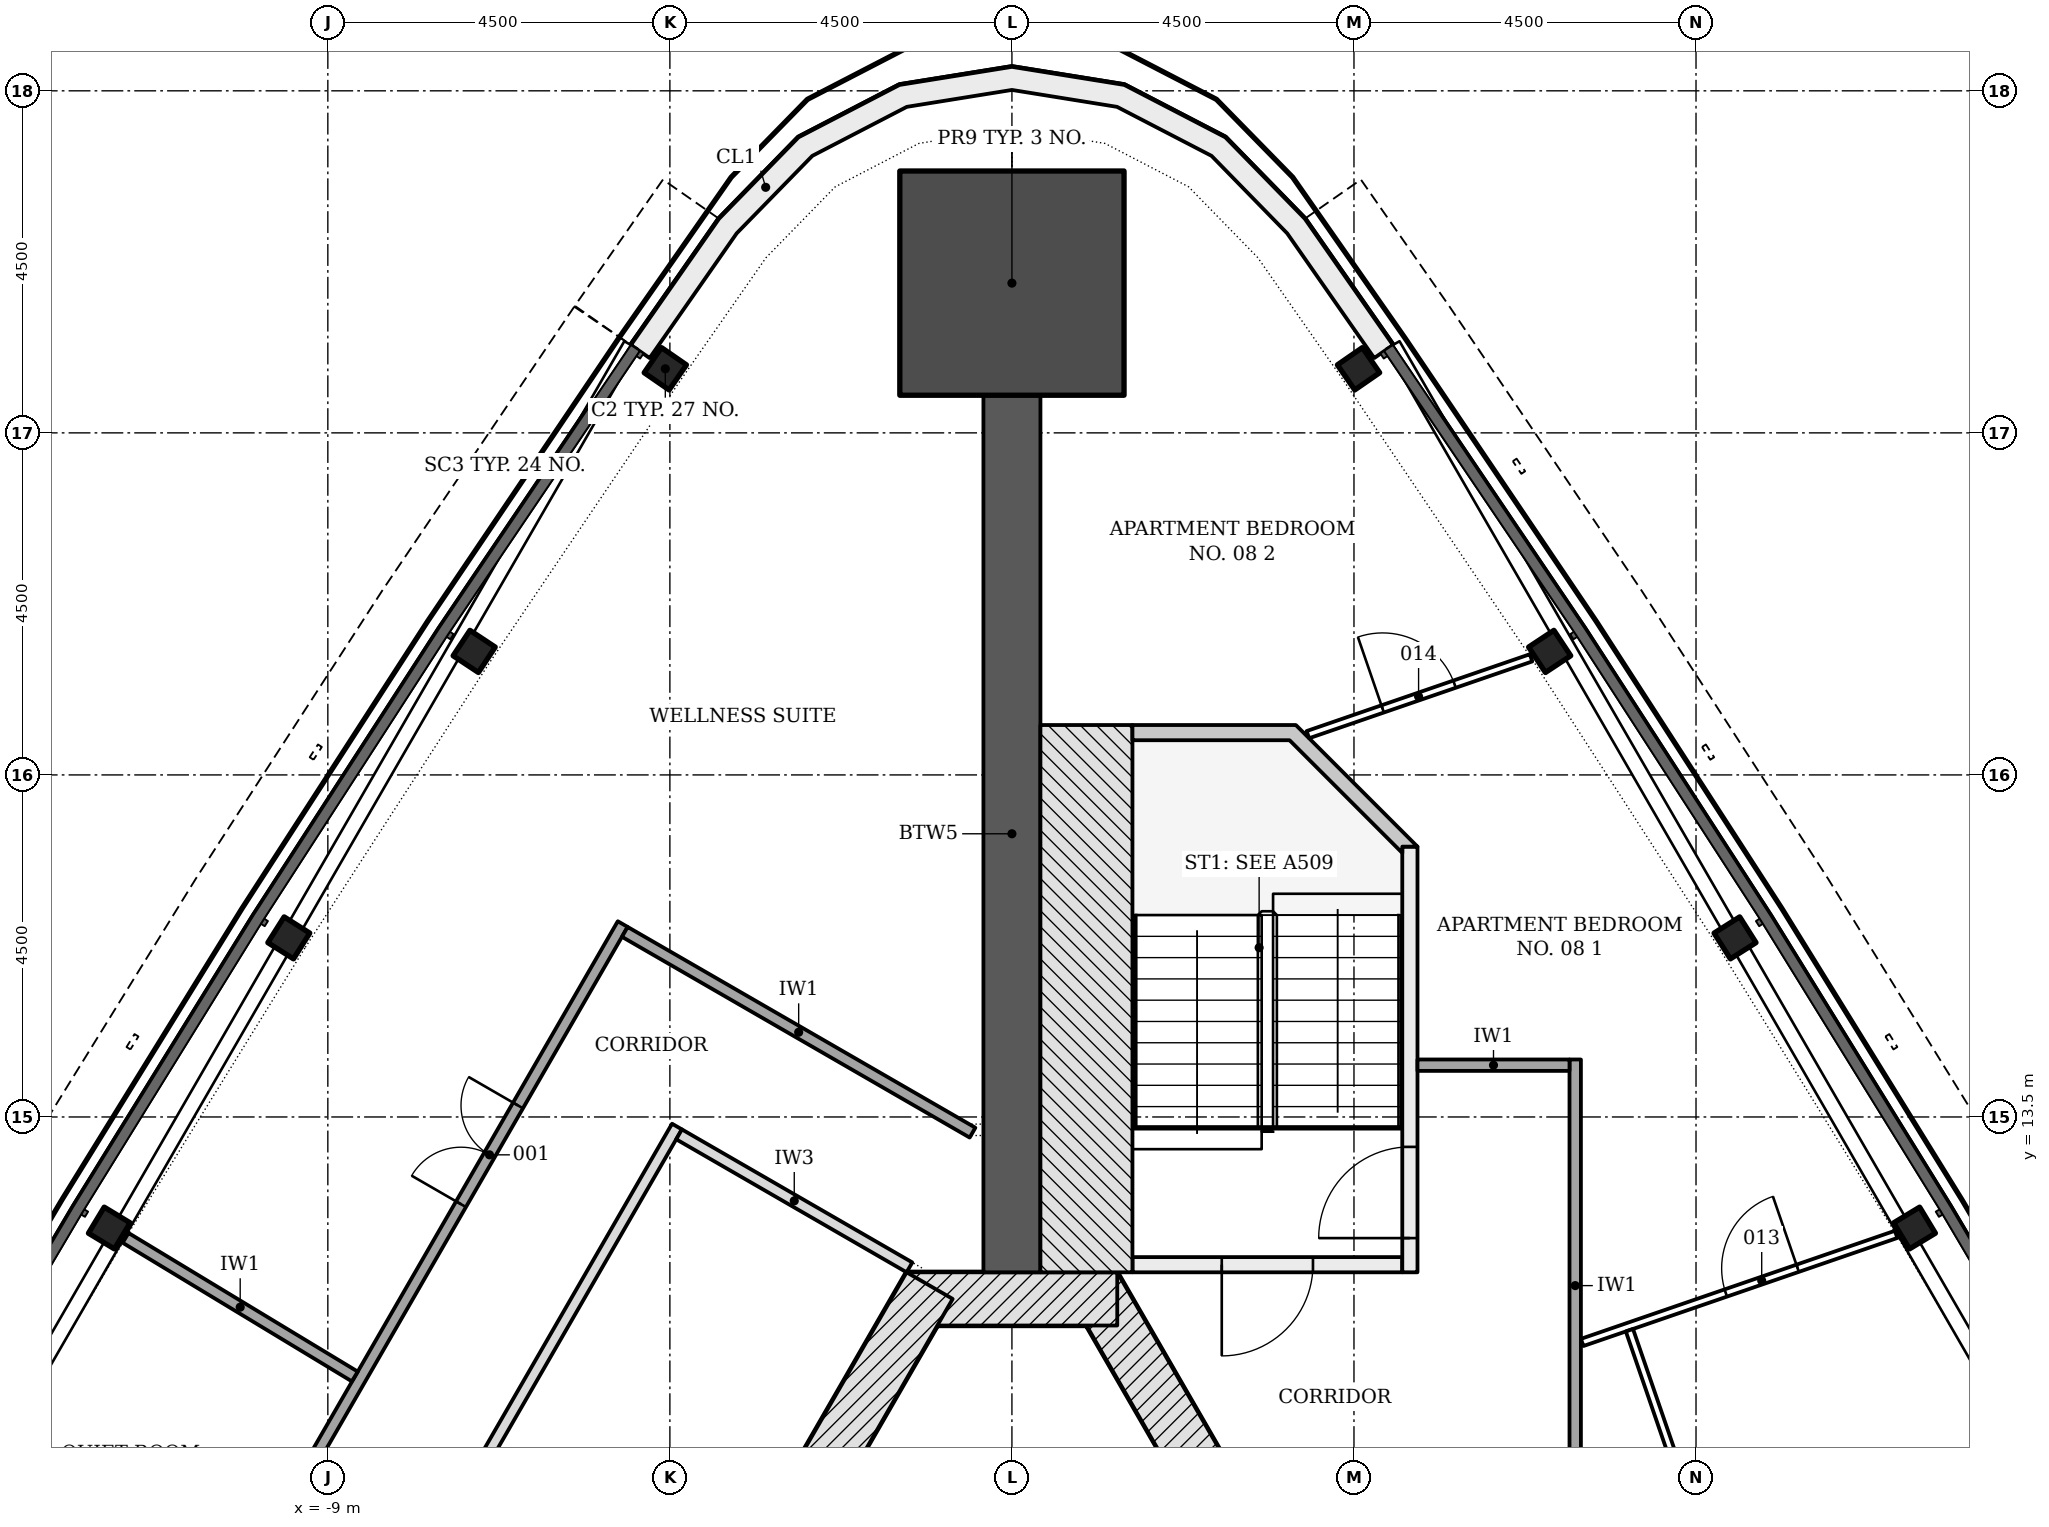
"""IFC4 building model, lengths in metres.
Left out: names, types, materials, properties, quantities, classifications, styles, units other than length and angle.
Written with IfcOpenShell. Run it as: python <this file> out.ifc"""

import sys

from ifc_helpers import new_model, si_unit, direction, frame, frame_2d, origin, origin_2d, place, context, subcontext, project, spatial, polyline, rectangle, i_section, outline, extrude, element, fill, save


model = new_model("IFC4")
c1 = context("Model", 3, precision=1e-05, world=origin(), true_north=direction((0.0, 1.0)))
c2 = subcontext(c1, "Body", "Model", "MODEL_VIEW")
j1 = project(units=[si_unit("LENGTHUNIT", "METRE"), si_unit("PLANEANGLEUNIT", "RADIAN")], contexts=[c1])
p1 = place(None, origin())
s1 = spatial("IfcSite", under=j1, at=p1, CompositionType="ELEMENT")
p2 = place(p1, origin())
s2 = spatial("IfcBuilding", under=s1, at=p2, CompositionType="ELEMENT")
p3 = place(p2, frame((0.0, 0.0, 116.7)))
s3 = spatial("IfcBuildingStorey", under=s2, at=p3, CompositionType="ELEMENT", Elevation=116.7)
p4 = place(p3, frame((10.311, -4.703, -0.2), z_axis=(0.0, 0.0, 1.0), x_axis=(-0.500001446645, 0.866024568562, 0.0)))
e1 = element("IfcWall", 1, at=p4, inside=s3, PredefinedType="SHEAR", context=c2, shape_type="SweptSolid", body=[
    extrude(rectangle(XDim=18.458, YDim=0.7, at=frame_2d((9.229, 0.0))), origin(), (0.0, 0.0, 1.0), 3.6),
])
p5 = place(p4, frame((7.5, 0.0, 0.2)))
e2 = element("IfcOpeningElement", 2, at=p5, cuts=e1, PredefinedType="OPENING", context=c2, shape_type="SweptSolid", body=[
    extrude(rectangle(XDim=1.0, YDim=2.1, at=frame_2d((0.5, 1.05))), frame((0.0, 0.36, 0.0), z_axis=(0.0, -1.0, 0.0), x_axis=(1.0, 0.0, 0.0)), (0.0, 0.0, 1.0), 0.72),
])
p6 = place(p4, frame((1.852, 0.0, 0.2)))
e3 = element("IfcOpeningElement", 3, at=p6, cuts=e1, PredefinedType="OPENING", context=c2, shape_type="SweptSolid", body=[
    extrude(rectangle(XDim=0.9, YDim=2.1, at=frame_2d((0.45, 1.05))), frame((0.0, 0.36, 0.0), z_axis=(0.0, -1.0, 0.0), x_axis=(1.0, 0.0, 0.0)), (0.0, 0.0, 1.0), 0.72),
])
p7 = place(p4, frame((5.238, 0.0, 0.2)))
e4 = element("IfcOpeningElement", 4, at=p7, cuts=e1, PredefinedType="OPENING", context=c2, shape_type="SweptSolid", body=[
    extrude(rectangle(XDim=1.0, YDim=2.1, at=frame_2d((0.5, 1.05))), frame((0.0, 0.36, 0.0), z_axis=(0.0, -1.0, 0.0), x_axis=(1.0, 0.0, 0.0)), (0.0, 0.0, 1.0), 0.72),
])
p8 = place(p4, frame((13.63, 0.0, 0.2)))
e5 = element("IfcOpeningElement", 5, at=p8, cuts=e1, PredefinedType="OPENING", context=c2, shape_type="SweptSolid", body=[
    extrude(rectangle(XDim=0.9, YDim=2.1, at=frame_2d((0.45, 1.05))), frame((0.0, 0.36, 0.0), z_axis=(0.0, -1.0, 0.0), x_axis=(1.0, 0.0, 0.0)), (0.0, 0.0, 1.0), 0.72),
])
p9 = place(p3, frame((1.386, 11.106, -0.2), z_axis=(0.0, 0.0, 1.0), x_axis=(-1.0, 0.0, 0.0)))
e6 = element("IfcWall", 6, at=p9, inside=s3, PredefinedType="SHEAR", context=c2, shape_type="SweptSolid", body=[
    extrude(rectangle(XDim=2.771, YDim=0.7, at=frame_2d((1.386, 0.0))), origin(), (0.0, 0.0, 1.0), 3.6),
])
p10 = place(p3, frame((-1.083, 11.281, -0.2), z_axis=(0.0, 0.0, 1.0), x_axis=(-0.500001446645, -0.866024568562, 0.0)))
e7 = element("IfcWall", 7, at=p10, inside=s3, PredefinedType="SHEAR", context=c2, shape_type="SweptSolid", body=[
    extrude(rectangle(XDim=18.458, YDim=0.7, at=frame_2d((9.229, 0.0))), origin(), (0.0, 0.0, 1.0), 3.6),
])
p11 = place(p10, frame((8.979, 0.0, 0.2)))
e8 = element("IfcOpeningElement", 8, at=p11, cuts=e7, PredefinedType="OPENING", context=c2, shape_type="SweptSolid", body=[
    extrude(rectangle(XDim=1.2, YDim=2.1, at=frame_2d((0.6, 1.05))), frame((0.0, 0.36, 0.0), z_axis=(0.0, -1.0, 0.0), x_axis=(1.0, 0.0, 0.0)), (0.0, 0.0, 1.0), 0.72),
])
p12 = place(p10, frame((11.029, 0.0, 0.2)))
e9 = element("IfcOpeningElement", 9, at=p12, cuts=e7, PredefinedType="OPENING", context=c2, shape_type="SweptSolid", body=[
    extrude(rectangle(XDim=1.2, YDim=2.1, at=frame_2d((0.6, 1.05))), frame((0.0, 0.36, 0.0), z_axis=(0.0, -1.0, 0.0), x_axis=(1.0, 0.0, 0.0)), (0.0, 0.0, 1.0), 0.72),
])
p13 = place(p3, frame((0.0, 11.456, -0.2), z_axis=(0.0, 0.0, 1.0), x_axis=(0.0, 1.0, 0.0)))
e10 = element("IfcWall", 10, at=p13, inside=s3, PredefinedType="SHEAR", context=c2, shape_type="SweptSolid", body=[
    extrude(rectangle(XDim=11.539, YDim=0.75, at=frame_2d((5.77, 0.0))), origin(), (0.0, 0.0, 1.0), 3.6),
])
p14 = place(p3, frame((0.0, 24.47, -0.2), z_axis=(0.0, 0.0, 1.0), x_axis=(0.0, 1.0, 0.0)))
e11 = element("IfcColumn", 11, at=p14, inside=s3, PredefinedType="COLUMN", context=c2, shape_type="SweptSolid", body=[
    extrude(rectangle(XDim=2.95, YDim=2.95, at=origin_2d()), origin(), (0.0, 0.0, 1.0), 3.6),
])
for number, where, z_axis, x_axis in (
    (12, (-4.56, 23.343, -0.2), (0.0, 0.0, 1.0), (-0.569, -0.823, 0.0)),
    (13, (-7.075, 19.625, -0.2), (0.0, 0.0, 1.0), (-0.552, -0.834, 0.0)),
    (14, (-9.513, 15.856, -0.2), (0.0, 0.0, 1.0), (-0.535, -0.845, 0.0)),
    (15, (-11.875, 12.039, -0.2), (0.0, 0.0, 1.0), (-0.517, -0.856, 0.0)),
    (16, (11.875, 12.039, -0.2), (0.0, 0.0, 1.0), (-0.517, 0.856, 0.0)),
    (17, (9.513, 15.856, -0.2), (0.0, 0.0, 1.0), (-0.535, 0.845, 0.0)),
    (18, (7.075, 19.625, -0.2), (0.0, 0.0, 1.0), (-0.552, 0.834, 0.0)),
    (19, (4.56, 23.343, -0.2), (0.0, 0.0, 1.0), (-0.569, 0.823, 0.0)),
):
    element("IfcColumn", number, at=place(p3, frame(where, z_axis=z_axis, x_axis=x_axis)), inside=s3, PredefinedType="COLUMN", context=c2, shape_type="SweptSolid", body=[
        extrude(i_section(OverallWidth=0.401, OverallDepth=0.399, WebThickness=0.025, FlangeThickness=0.04, FilletRadius=0.015, at=origin_2d()), origin(), (0.0, 0.0, 1.0), 3.6),
    ])
p15 = place(p3, origin())
e20 = element("IfcWall", 20, at=p15, inside=s3, PredefinedType="NOTDEFINED", context=c2, shape_type="SweptSolid", body=[
    extrude(outline(polyline([(5.013, 23.656), (3.853, 25.317), (2.807, 26.388), (1.478, 27.078), (0.0, 27.315), (-1.478, 27.078), (-2.807, 26.388), (-3.853, 25.317), (-5.013, 23.656), (-4.767, 23.484), (-3.621, 25.125), (-2.626, 26.144), (-1.383, 26.789), (0.0, 27.011), (1.383, 26.789), (2.626, 26.144), (3.621, 25.125), (4.767, 23.484), (5.013, 23.656)])), origin(), (0.0, 0.0, 1.0), 3.3),
])
p16 = place(p3, frame((5.135, 11.556, -0.2), z_axis=(0.0, 0.0, 1.0), x_axis=(-1.0, 0.0, 0.0)))
e21 = element("IfcWall", 21, at=p16, inside=s3, PredefinedType="SHEAR", context=c2, shape_type="SweptSolid", body=[
    extrude(rectangle(XDim=3.55, YDim=0.2, at=frame_2d((1.775, 0.0))), origin(), (0.0, 0.0, 1.0), 3.6),
])
p17 = place(p16, frame((1.175, 0.0, 0.2)))
e22 = element("IfcOpeningElement", 22, at=p17, cuts=e21, PredefinedType="OPENING", context=c2, shape_type="SweptSolid", body=[
    extrude(rectangle(XDim=1.2, YDim=2.1, at=frame_2d((0.6, 1.05))), frame((0.0, 0.11, 0.0), z_axis=(0.0, -1.0, 0.0), x_axis=(1.0, 0.0, 0.0)), (0.0, 0.0, 1.0), 0.22),
])
p18 = place(p3, frame((5.236, 11.456, -0.2), z_axis=(0.0, 0.0, 1.0), x_axis=(0.0, 1.0, 0.0)))
e23 = element("IfcWall", 23, at=p18, inside=s3, PredefinedType="SHEAR", context=c2, shape_type="SweptSolid", body=[
    extrude(rectangle(XDim=5.6, YDim=0.2, at=frame_2d((2.8, 0.0))), origin(), (0.0, 0.0, 1.0), 3.6),
])
p19 = place(p18, frame((0.45, 0.0, 0.2)))
e24 = element("IfcOpeningElement", 24, at=p19, cuts=e23, PredefinedType="OPENING", context=c2, shape_type="SweptSolid", body=[
    extrude(rectangle(XDim=1.2, YDim=2.1, at=frame_2d((0.6, 1.05))), frame((0.0, 0.11, 0.0), z_axis=(0.0, -1.0, 0.0), x_axis=(1.0, 0.0, 0.0)), (0.0, 0.0, 1.0), 0.22),
])
p20 = place(p3, frame((0.98, 11.456, -0.2), z_axis=(0.0, 0.0, 1.0), x_axis=(0.0, 1.0, 0.0)))
e25 = element("IfcWall", 25, at=p20, inside=s3, PredefinedType="SHEAR", context=c2, shape_type="SweptSolid", body=[
    extrude(rectangle(XDim=7.2, YDim=1.211, at=frame_2d((3.6, 0.0))), origin(), (0.0, 0.0, 1.0), 3.6),
])
p21 = place(p3, frame((0.0, 0.0, -0.2)))
e26 = element("IfcWall", 26, at=p21, inside=s3, PredefinedType="SHEAR", context=c2, shape_type="SweptSolid", body=[
    extrude(outline(polyline([(5.336, 17.056), (3.736, 18.656), (1.586, 18.656), (1.586, 18.456), (3.653, 18.456), (5.135, 16.974), (5.135, 17.056), (5.135, 17.056), (5.135, 17.056), (5.135, 17.056), (5.135, 17.056), (5.135, 17.056), (5.135, 17.056), (5.135, 17.056), (5.135, 17.056), (5.135, 17.056), (5.135, 17.056), (5.135, 17.056), (5.135, 17.056), (5.135, 17.056), (5.135, 17.056), (5.135, 17.056), (5.135, 17.056), (5.336, 17.056)])), origin(), (0.0, 0.0, 1.0), 3.6),
])
p22 = place(p3, frame((-16.169, -3.099, 0.0), z_axis=(0.0, 0.0, 1.0), x_axis=(0.499999805269, 0.866025516212, 0.0)))
e27 = element("IfcWall", 27, at=p22, inside=s3, PredefinedType="PARTITIONING", context=c2, shape_type="SweptSolid", body=[
    extrude(rectangle(XDim=22.097, YDim=0.15, at=frame_2d((11.049, 0.0))), origin(), (0.0, 0.0, 1.0), 2.847),
])
p23 = place(p22, frame((17.842, 0.0, 0.0)))
e28 = element("IfcOpeningElement", 28, at=p23, cuts=e27, PredefinedType="OPENING", context=c2, shape_type="SweptSolid", body=[
    extrude(rectangle(XDim=1.5, YDim=2.1, at=frame_2d((0.75, 1.05))), frame((0.0, 0.085, 0.0), z_axis=(0.0, -1.0, 0.0), x_axis=(1.0, 0.0, 0.0)), (0.0, 0.0, 1.0), 0.17),
])
p24 = place(p22, frame((12.474, 0.0, 0.0)))
e29 = element("IfcOpeningElement", 29, at=p24, cuts=e27, PredefinedType="OPENING", context=c2, shape_type="SweptSolid", body=[
    extrude(rectangle(XDim=1.0, YDim=2.1, at=frame_2d((0.5, 1.05))), frame((0.0, 0.085, 0.0), z_axis=(0.0, -1.0, 0.0), x_axis=(1.0, 0.0, 0.0)), (0.0, 0.0, 1.0), 0.17),
])
p25 = place(p22, frame((4.503, 0.0, 0.0)))
e30 = element("IfcOpeningElement", 30, at=p25, cuts=e27, PredefinedType="OPENING", context=c2, shape_type="SweptSolid", body=[
    extrude(rectangle(XDim=1.5, YDim=2.1, at=frame_2d((0.75, 1.05))), frame((0.0, 0.085, 0.0), z_axis=(0.0, -1.0, 0.0), x_axis=(1.0, 0.0, 0.0)), (0.0, 0.0, 1.0), 0.17),
])
p26 = place(p3, frame((-4.407, 13.374, 0.0), z_axis=(0.0, 0.0, 1.0), x_axis=(-0.499997181693, -0.866027030928, 0.0)))
e31 = element("IfcWall", 31, at=p26, inside=s3, PredefinedType="PARTITIONING", context=c2, shape_type="SweptSolid", body=[
    extrude(rectangle(XDim=16.77, YDim=0.15, at=frame_2d((8.385, 0.0))), origin(), (0.0, 0.0, 1.0), 2.847),
])
p27 = place(p26, frame((8.879, 0.0, 0.0)))
e32 = element("IfcOpeningElement", 32, at=p27, cuts=e31, PredefinedType="OPENING", context=c2, shape_type="SweptSolid", body=[
    extrude(rectangle(XDim=1.0, YDim=2.1, at=frame_2d((0.5, 1.05))), frame((0.0, 0.085, 0.0), z_axis=(0.0, -1.0, 0.0), x_axis=(1.0, 0.0, 0.0)), (0.0, 0.0, 1.0), 0.17),
])
p28 = place(p3, frame((7.411, 8.306, 0.0), z_axis=(0.0, 0.0, 1.0), x_axis=(0.0, 1.0, 0.0)))
e33 = element("IfcWall", 33, at=p28, inside=s3, PredefinedType="PARTITIONING", context=c2, shape_type="SweptSolid", body=[
    extrude(rectangle(XDim=5.95, YDim=0.15, at=frame_2d((2.975, 0.0))), origin(), (0.0, 0.0, 1.0), 2.847),
])
p29 = place(p3, frame((-5.093, 15.935, 0.0), z_axis=(0.0, 0.0, 1.0), x_axis=(0.866033195618, -0.499986503906, 0.0)))
e34 = element("IfcWall", 34, at=p29, inside=s3, PredefinedType="PARTITIONING", context=c2, shape_type="SweptSolid", body=[
    extrude(rectangle(XDim=5.282, YDim=0.15, at=frame_2d((2.641, 0.0))), origin(), (0.0, 0.0, 1.0), 3.4),
])
p30 = place(p3, frame((-4.379, 13.271, 0.0), z_axis=(0.0, 0.0, 1.0), x_axis=(0.866019471182, -0.500010275428, 0.0)))
e35 = element("IfcWall", 35, at=p30, inside=s3, PredefinedType="PARTITIONING", context=c2, shape_type="SweptSolid", body=[
    extrude(rectangle(XDim=3.5, YDim=0.15, at=frame_2d((1.75, 0.0))), origin(), (0.0, 0.0, 1.0), 3.4),
])
p31 = place(p3, frame((5.336, 14.181, 0.0), z_axis=(0.0, 0.0, 1.0), x_axis=(1.0, 0.0, 0.0)))
e36 = element("IfcWall", 36, at=p31, inside=s3, PredefinedType="PARTITIONING", context=c2, shape_type="SweptSolid", body=[
    extrude(rectangle(XDim=2.0, YDim=0.15, at=frame_2d((1.0, 0.0))), origin(), (0.0, 0.0, 1.0), 2.923),
])
p32 = place(p3, frame((-11.661, 11.91, 0.0), z_axis=(0.0, 0.0, 1.0), x_axis=(0.855697033778, -0.517477136098, 0.0)))
e37 = element("IfcWall", 37, at=p32, inside=s3, PredefinedType="PARTITIONING", context=c2, shape_type="SweptSolid", body=[
    extrude(rectangle(XDim=3.525, YDim=0.15, at=frame_2d((1.762, 0.0))), origin(), (0.0, 0.0, 1.0), 2.847),
])
p33 = place(p3, frame((7.502, 10.534, 0.0), z_axis=(0.0, 0.0, 1.0), x_axis=(0.945553375074, 0.325467071893, 0.0)))
e38 = element("IfcWall", 38, at=p33, inside=s3, PredefinedType="PARTITIONING", context=c2, shape_type="SweptSolid", body=[
    extrude(rectangle(XDim=4.369, YDim=0.1, at=frame_2d((2.184, 0.0))), origin(), (0.0, 0.0, 1.0), 2.847),
])
p34 = place(p33, frame((1.998, 0.0, 0.0)))
e39 = element("IfcOpeningElement", 39, at=p34, cuts=e38, PredefinedType="OPENING", context=c2, shape_type="SweptSolid", body=[
    extrude(rectangle(XDim=1.0, YDim=2.1, at=frame_2d((0.5, 1.05))), frame((0.0, 0.06, 0.0), z_axis=(0.0, -1.0, 0.0), x_axis=(1.0, 0.0, 0.0)), (0.0, 0.0, 1.0), 0.12),
])
p35 = place(p3, frame((3.893, 18.53, 0.0), z_axis=(0.0, 0.0, 1.0), x_axis=(0.945532429383, 0.325527917366, 0.0)))
e40 = element("IfcWall", 40, at=p35, inside=s3, PredefinedType="PARTITIONING", context=c2, shape_type="SweptSolid", body=[
    extrude(rectangle(XDim=3.106, YDim=0.1, at=frame_2d((1.553, 0.0))), origin(), (0.0, 0.0, 1.0), 2.974),
])
p36 = place(p35, frame((1.041, 0.0, 0.0)))
e41 = element("IfcOpeningElement", 41, at=p36, cuts=e40, PredefinedType="OPENING", context=c2, shape_type="SweptSolid", body=[
    extrude(rectangle(XDim=1.0, YDim=2.1, at=frame_2d((0.5, 1.05))), frame((0.0, 0.06, 0.0), z_axis=(0.0, -1.0, 0.0), x_axis=(1.0, 0.0, 0.0)), (0.0, 0.0, 1.0), 0.12),
])
p37 = place(p3, frame((8.124, 10.695, 0.0), z_axis=(0.0, 0.0, 1.0), x_axis=(0.325536334257, -0.945529531574, 0.0)))
e42 = element("IfcWall", 42, at=p37, inside=s3, PredefinedType="PARTITIONING", context=c2, shape_type="SweptSolid", body=[
    extrude(rectangle(XDim=2.6, YDim=0.1, at=frame_2d((1.3, 0.0))), origin(), (0.0, 0.0, 1.0), 2.847),
])
p38 = place(p17, origin())
e43 = element("IfcDoor", 43, at=p38, inside=s3, OperationType="SINGLE_SWING_RIGHT", PredefinedType="DOOR", context=c2, shape_type="SweptSolid", body=[
    extrude(rectangle(XDim=1.2, YDim=2.1, at=frame_2d((0.6, 1.05))), frame((0.0, 0.025, 0.0), z_axis=(0.0, -1.0, 0.0), x_axis=(1.0, 0.0, 0.0)), (0.0, 0.0, 1.0), 0.05),
])
fill(e22, e43)
p39 = place(p19, origin())
e44 = element("IfcDoor", 44, at=p39, inside=s3, OperationType="SINGLE_SWING_LEFT", PredefinedType="DOOR", context=c2, shape_type="SweptSolid", body=[
    extrude(rectangle(XDim=1.2, YDim=2.1, at=frame_2d((0.6, 1.05))), frame((0.0, 0.025, 0.0), z_axis=(0.0, -1.0, 0.0), x_axis=(1.0, 0.0, 0.0)), (0.0, 0.0, 1.0), 0.05),
])
fill(e24, e44)
p40 = place(p23, origin())
e45 = element("IfcDoor", 45, at=p40, inside=s3, OperationType="DOUBLE_DOOR_SINGLE_SWING", PredefinedType="DOOR", context=c2, shape_type="SweptSolid", body=[
    extrude(rectangle(XDim=1.5, YDim=2.1, at=frame_2d((0.75, 1.05))), frame((0.0, 0.025, 0.0), z_axis=(0.0, -1.0, 0.0), x_axis=(1.0, 0.0, 0.0)), (0.0, 0.0, 1.0), 0.05),
])
fill(e28, e45)
p41 = place(p34, origin())
e46 = element("IfcDoor", 46, at=p41, inside=s3, OperationType="SINGLE_SWING_RIGHT", PredefinedType="DOOR", context=c2, shape_type="SweptSolid", body=[
    extrude(rectangle(XDim=1.0, YDim=2.1, at=frame_2d((0.5, 1.05))), frame((0.0, 0.025, 0.0), z_axis=(0.0, -1.0, 0.0), x_axis=(1.0, 0.0, 0.0)), (0.0, 0.0, 1.0), 0.05),
])
fill(e39, e46)
p42 = place(p36, origin())
e47 = element("IfcDoor", 47, at=p42, inside=s3, OperationType="SINGLE_SWING_LEFT", PredefinedType="DOOR", context=c2, shape_type="SweptSolid", body=[
    extrude(rectangle(XDim=1.0, YDim=2.1, at=frame_2d((0.5, 1.05))), frame((0.0, 0.025, 0.0), z_axis=(0.0, -1.0, 0.0), x_axis=(1.0, 0.0, 0.0)), (0.0, 0.0, 1.0), 0.05),
])
fill(e41, e47)
save(model, sys.argv[1])
